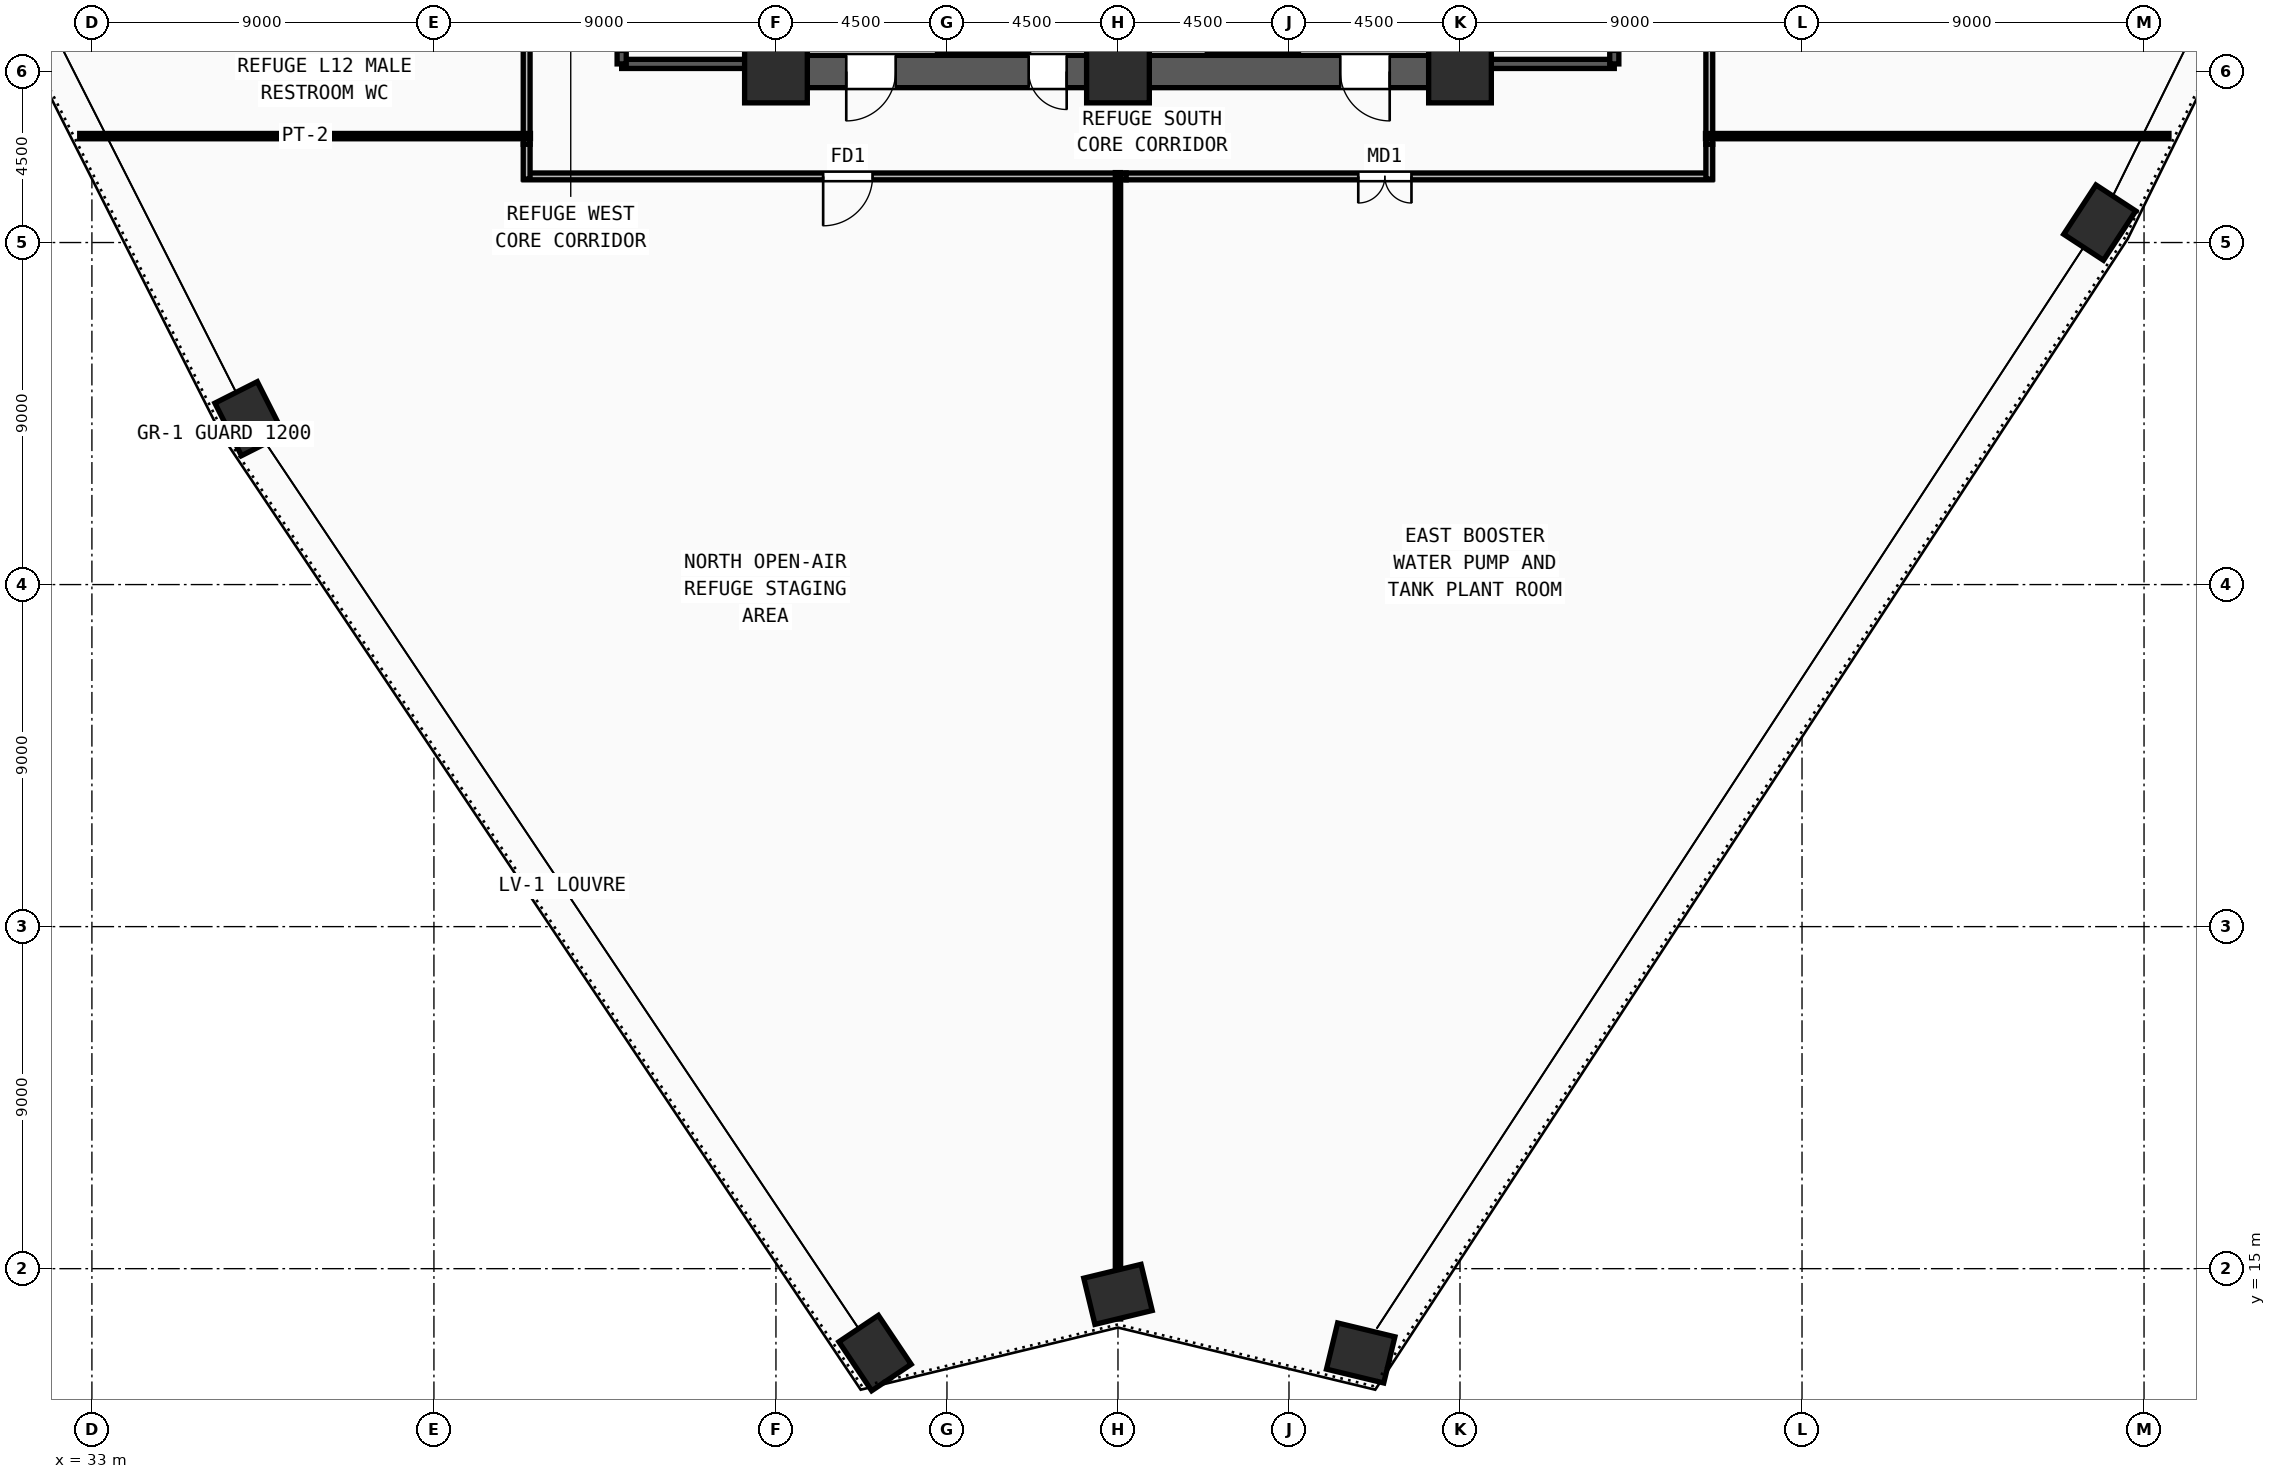
"""IFC4 building model, lengths in metres.
Left out: names, types, materials, properties, quantities, classifications, styles, units other than length and angle.
Written with IfcOpenShell. Run it as: python <this file> out.ifc"""

import sys

from ifc_helpers import new_model, si_unit, direction, frame, frame_2d, origin, origin_2d, place, context, subcontext, project, spatial, rectangle, extrude, source, transform, mapped, element, fill, save


model = new_model("IFC4")
c1 = context("Model", 3, precision=1e-05, world=origin(), true_north=direction((0.0, 1.0)))
c2 = subcontext(c1, "Body", "Model", "MODEL_VIEW")
j1 = project(units=[si_unit("LENGTHUNIT", "METRE"), si_unit("PLANEANGLEUNIT", "RADIAN")], contexts=[c1])
p1 = place(None, origin())
s1 = spatial("IfcSite", under=j1, at=p1, CompositionType="ELEMENT")
p2 = place(p1, origin())
s2 = spatial("IfcBuilding", under=s1, at=p2, CompositionType="ELEMENT")
p3 = place(p2, frame((0.0, 0.0, 47.25)))
s3 = spatial("IfcBuildingStorey", under=s2, at=p3, CompositionType="ELEMENT", Elevation=47.25)
m1 = source(origin(), c2, "Body", "SweptSolid", [
    extrude(rectangle(XDim=1.65, YDim=1.65, at=origin_2d()), origin(), (0.0, 0.0, 1.0), 4.5),
])
for number, where, z_axis, x_axis in (
    (1, (51.0, 46.5, 0.0), (0.0, 0.0, 1.0), (1.0, 0.0, 0.0)),
    (2, (60.0, 46.5, 0.0), (0.0, 0.0, 1.0), (1.0, 0.0, 0.0)),
    (3, (69.0, 46.5, 0.0), (0.0, 0.0, 1.0), (1.0, 0.0, 0.0)),
):
    element("IfcColumn", number, at=place(p3, frame(where, z_axis=z_axis, x_axis=x_axis)), inside=s3, PredefinedType="COLUMN", context=c2, shape_type="MappedRepresentation", body=[
        mapped(m1, transform((0.0, 0.0, 0.0), x_axis=(1.0, 0.0, 0.0), y_axis=(0.0, 1.0, 0.0), z_axis=(0.0, 0.0, 1.0), scale=1.0)),
    ])
m2 = source(origin(), c2, "Body", "SweptSolid", [
    extrude(rectangle(XDim=1.55, YDim=1.25, at=origin_2d()), origin(), (0.0, 0.0, 1.0), 4.5),
])
for number, where, z_axis, x_axis in (
    (4, (53.607, 12.78, 0.0), (0.0, 0.0, 1.0), (-0.556, 0.831, 0.0)),
    (5, (37.144, 37.365, 0.0), (0.0, 0.0, 1.0), (-0.451, 0.892, 0.0)),
    (6, (85.834, 42.524, 0.0), (0.0, 0.0, 1.0), (0.547, 0.837, 0.0)),
    (7, (66.387, 12.782, 0.0), (0.0, 0.0, 1.0), (-0.972, 0.235, 0.0)),
    (8, (60.0, 14.324, 0.0), (0.0, 0.0, 1.0), (0.972, 0.235, 0.0)),
):
    element("IfcColumn", number, at=place(p3, frame(where, z_axis=z_axis, x_axis=x_axis)), inside=s3, PredefinedType="COLUMN", context=c2, shape_type="MappedRepresentation", body=[
        mapped(m2, transform((0.0, 0.0, 0.0), x_axis=(1.0, 0.0, 0.0), y_axis=(0.0, 1.0, 0.0), z_axis=(0.0, 0.0, 1.0), scale=1.0)),
    ])
p4 = place(p3, frame((68.175, 46.5, 0.0), z_axis=(0.0, 0.0, 1.0), x_axis=(-1.0, 0.0, 0.0)))
e9 = element("IfcWall", 9, at=p4, inside=s3, PredefinedType="SHEAR", context=c2, shape_type="SweptSolid", body=[
    extrude(rectangle(XDim=7.35, YDim=0.85, at=frame_2d((3.675, 0.0))), origin(), (0.0, 0.0, 1.0), 4.32),
])
m3 = source(origin(), c2, "Body", "SweptSolid", [
    extrude(rectangle(XDim=1.3, YDim=2.2, at=frame_2d((0.65, 1.1))), frame((0.0, 0.435, 0.0), z_axis=(0.0, -1.0, 0.0), x_axis=(1.0, 0.0, 0.0)), (0.0, 0.0, 1.0), 0.87),
])
p5 = place(p4, frame((1.025, 0.0, 0.0)))
e10 = element("IfcOpeningElement", 10, at=p5, cuts=e9, PredefinedType="OPENING", context=c2, shape_type="MappedRepresentation", body=[
    mapped(m3, transform((0.0, 0.0, 0.0), x_axis=(1.0, 0.0, 0.0), y_axis=(0.0, 1.0, 0.0), z_axis=(0.0, 0.0, 1.0), scale=1.0)),
])
p6 = place(p3, frame((59.175, 46.5, 0.0), z_axis=(0.0, 0.0, 1.0), x_axis=(-1.0, 0.0, 0.0)))
e11 = element("IfcWall", 11, at=p6, inside=s3, PredefinedType="SHEAR", context=c2, shape_type="SweptSolid", body=[
    extrude(rectangle(XDim=7.35, YDim=0.85, at=frame_2d((3.675, 0.0))), origin(), (0.0, 0.0, 1.0), 4.32),
])
p7 = place(p6, frame((5.025, 0.0, 0.0)))
e12 = element("IfcOpeningElement", 12, at=p7, cuts=e11, PredefinedType="OPENING", context=c2, shape_type="MappedRepresentation", body=[
    mapped(m3, transform((0.0, 0.0, 0.0), x_axis=(1.0, 0.0, 0.0), y_axis=(0.0, 1.0, 0.0), z_axis=(0.0, 0.0, 1.0), scale=1.0)),
])
m4 = source(origin(), c2, "Body", "SweptSolid", [
    extrude(rectangle(XDim=1.0, YDim=2.2, at=frame_2d((0.5, 1.1))), frame((0.0, 0.435, 0.0), z_axis=(0.0, -1.0, 0.0), x_axis=(1.0, 0.0, 0.0)), (0.0, 0.0, 1.0), 0.87),
])
p8 = place(p6, frame((0.525, 0.0, 0.0)))
e13 = element("IfcOpeningElement", 13, at=p8, cuts=e11, PredefinedType="OPENING", context=c2, shape_type="MappedRepresentation", body=[
    mapped(m4, transform((0.0, 0.0, 0.0), x_axis=(1.0, 0.0, 0.0), y_axis=(0.0, 1.0, 0.0), z_axis=(0.0, 0.0, 1.0), scale=1.0)),
])
p9 = place(p3, frame((46.94, 46.7, 0.0), z_axis=(0.0, 0.0, 1.0), x_axis=(1.0, 0.0, 0.0)))
e14 = element("IfcWall", 14, at=p9, inside=s3, PredefinedType="SOLIDWALL", context=c2, shape_type="SweptSolid", body=[
    extrude(rectangle(XDim=3.44, YDim=0.24, at=frame_2d((1.72, 0.0))), origin(), (0.0, 0.0, 1.0), 4.32),
])
p10 = place(p3, frame((50.38, 46.7, 0.0), z_axis=(0.0, 0.0, 1.0), x_axis=(0.0, 1.0, 0.0)))
e15 = element("IfcWall", 15, at=p10, inside=s3, PredefinedType="SOLIDWALL", context=c2, shape_type="SweptSolid", body=[
    extrude(rectangle(XDim=7.82, YDim=0.24, at=frame_2d((3.91, 0.0))), origin(), (0.0, 0.0, 1.0), 4.32),
])
p11 = place(p3, frame((46.94, 54.52, 0.0), z_axis=(0.0, 0.0, 1.0), x_axis=(0.0, -1.0, 0.0)))
e16 = element("IfcWall", 16, at=p11, inside=s3, PredefinedType="SOLIDWALL", context=c2, shape_type="SweptSolid", body=[
    extrude(rectangle(XDim=7.82, YDim=0.24, at=frame_2d((3.91, 0.0))), origin(), (0.0, 0.0, 1.0), 4.32),
])
m5 = source(origin(), c2, "Body", "SweptSolid", [
    extrude(rectangle(XDim=1.2, YDim=2.2, at=frame_2d((0.6, 1.1))), frame((0.0, 0.13, 0.0), z_axis=(0.0, -1.0, 0.0), x_axis=(1.0, 0.0, 0.0)), (0.0, 0.0, 1.0), 0.26),
])
p12 = place(p11, frame((6.3, 0.0, 0.0)))
e17 = element("IfcOpeningElement", 17, at=p12, cuts=e16, PredefinedType="OPENING", context=c2, shape_type="MappedRepresentation", body=[
    mapped(m5, transform((0.0, 0.0, 0.0), x_axis=(1.0, 0.0, 0.0), y_axis=(0.0, 1.0, 0.0), z_axis=(0.0, 0.0, 1.0), scale=1.0)),
])
p13 = place(p3, frame((69.62, 46.7, 0.0), z_axis=(0.0, 0.0, 1.0), x_axis=(1.0, 0.0, 0.0)))
e18 = element("IfcWall", 18, at=p13, inside=s3, PredefinedType="SOLIDWALL", context=c2, shape_type="SweptSolid", body=[
    extrude(rectangle(XDim=3.44, YDim=0.24, at=frame_2d((1.72, 0.0))), origin(), (0.0, 0.0, 1.0), 4.32),
])
p14 = place(p3, frame((73.06, 46.7, 0.0), z_axis=(0.0, 0.0, 1.0), x_axis=(0.0, 1.0, 0.0)))
e19 = element("IfcWall", 19, at=p14, inside=s3, PredefinedType="SOLIDWALL", context=c2, shape_type="SweptSolid", body=[
    extrude(rectangle(XDim=7.82, YDim=0.24, at=frame_2d((3.91, 0.0))), origin(), (0.0, 0.0, 1.0), 4.32),
])
p15 = place(p14, frame((0.32, 0.0, 0.0)))
e20 = element("IfcOpeningElement", 20, at=p15, cuts=e19, PredefinedType="OPENING", context=c2, shape_type="MappedRepresentation", body=[
    mapped(m5, transform((0.0, 0.0, 0.0), x_axis=(1.0, 0.0, 0.0), y_axis=(0.0, 1.0, 0.0), z_axis=(0.0, 0.0, 1.0), scale=1.0)),
])
p16 = place(p3, frame((69.62, 54.52, 0.0), z_axis=(0.0, 0.0, 1.0), x_axis=(0.0, -1.0, 0.0)))
e21 = element("IfcWall", 21, at=p16, inside=s3, PredefinedType="SOLIDWALL", context=c2, shape_type="SweptSolid", body=[
    extrude(rectangle(XDim=7.82, YDim=0.24, at=frame_2d((3.91, 0.0))), origin(), (0.0, 0.0, 1.0), 4.32),
])
p17 = place(p3, frame((75.56, 67.015, 0.0), z_axis=(0.0, 0.0, 1.0), x_axis=(0.0, -1.0, 0.0)))
e22 = element("IfcWall", 22, at=p17, inside=s3, PredefinedType="PARTITIONING", context=c2, shape_type="SweptSolid", body=[
    extrude(rectangle(XDim=22.43, YDim=0.18, at=frame_2d((11.215, 0.0))), origin(), (0.0, 0.0, 1.0), 4.32),
])
m6 = source(origin(), c2, "Body", "SweptSolid", [
    extrude(rectangle(XDim=1.3, YDim=2.2, at=frame_2d((0.65, 1.1))), frame((0.0, 0.1, 0.0), z_axis=(0.0, -1.0, 0.0), x_axis=(1.0, 0.0, 0.0)), (0.0, 0.0, 1.0), 0.2),
])
p18 = place(p17, frame((10.565, 0.0, 0.0)))
e23 = element("IfcOpeningElement", 23, at=p18, cuts=e22, PredefinedType="OPENING", context=c2, shape_type="MappedRepresentation", body=[
    mapped(m6, transform((0.0, 0.0, 0.0), x_axis=(1.0, 0.0, 0.0), y_axis=(0.0, 1.0, 0.0), z_axis=(0.0, 0.0, 1.0), scale=1.0)),
])
p19 = place(p3, frame((60.215, 43.74, 0.0), z_axis=(0.0, 0.0, 1.0), x_axis=(-1.0, 0.0, 0.0)))
e24 = element("IfcWall", 24, at=p19, inside=s3, PredefinedType="PARTITIONING", context=c2, shape_type="SweptSolid", body=[
    extrude(rectangle(XDim=15.845, YDim=0.18, at=frame_2d((7.922, 0.0))), origin(), (0.0, 0.0, 1.0), 4.32),
])
p20 = place(p19, frame((6.673, 0.0, 0.0)))
e25 = element("IfcOpeningElement", 25, at=p20, cuts=e24, PredefinedType="OPENING", context=c2, shape_type="MappedRepresentation", body=[
    mapped(m6, transform((0.0, 0.0, 0.0), x_axis=(1.0, 0.0, 0.0), y_axis=(0.0, 1.0, 0.0), z_axis=(0.0, 0.0, 1.0), scale=1.0)),
])
p21 = place(p3, frame((75.63, 43.74, 0.0), z_axis=(0.0, 0.0, 1.0), x_axis=(-1.0, 0.0, 0.0)))
e26 = element("IfcWall", 26, at=p21, inside=s3, PredefinedType="PARTITIONING", context=c2, shape_type="SweptSolid", body=[
    extrude(rectangle(XDim=15.415, YDim=0.18, at=frame_2d((7.708, 0.0))), origin(), (0.0, 0.0, 1.0), 4.32),
])
m7 = source(origin(), c2, "Body", "SweptSolid", [
    extrude(rectangle(XDim=1.4, YDim=2.25, at=frame_2d((0.7, 1.125))), frame((0.0, 0.1, 0.0), z_axis=(0.0, -1.0, 0.0), x_axis=(1.0, 0.0, 0.0)), (0.0, 0.0, 1.0), 0.2),
])
p22 = place(p21, frame((7.907, 0.0, 0.0)))
e27 = element("IfcOpeningElement", 27, at=p22, cuts=e26, PredefinedType="OPENING", context=c2, shape_type="MappedRepresentation", body=[
    mapped(m7, transform((0.0, 0.0, 0.0), x_axis=(1.0, 0.0, 0.0), y_axis=(0.0, 1.0, 0.0), z_axis=(0.0, 0.0, 1.0), scale=1.0)),
])
p23 = place(p3, frame((44.44, 44.585, 0.0), z_axis=(0.0, 0.0, 1.0), x_axis=(0.0, 1.0, 0.0)))
e28 = element("IfcWall", 28, at=p23, inside=s3, PredefinedType="PARTITIONING", context=c2, shape_type="SweptSolid", body=[
    extrude(rectangle(XDim=2.755, YDim=0.18, at=frame_2d((1.377, 0.0))), origin(), (0.0, 0.0, 1.0), 4.32),
])
for number, where, z_axis, x_axis in (
    (29, (44.44, 43.67, 0.0), (0.0, 0.0, 1.0), (0.0, 1.0, 0.0)),
    (30, (75.56, 44.585, 0.0), (0.0, 0.0, 1.0), (0.0, -1.0, 0.0)),
):
    element("IfcWall", number, at=place(p3, frame(where, z_axis=z_axis, x_axis=x_axis)), inside=s3, PredefinedType="PARTITIONING", context=c2, shape_type="SweptSolid", body=[
        extrude(rectangle(XDim=0.915, YDim=0.18, at=frame_2d((0.458, 0.0))), origin(), (0.0, 0.0, 1.0), 4.32),
    ])
p24 = place(p3, frame((44.54, 44.8, 0.0), z_axis=(0.0, 0.0, 1.0), x_axis=(-1.0, 0.0, 0.0)))
e31 = element("IfcWall", 31, at=p24, inside=s3, PredefinedType="PARTITIONING", context=c2, shape_type="SweptSolid", body=[
    extrude(rectangle(XDim=11.861, YDim=0.14, at=frame_2d((5.931, 0.0))), origin(), (0.0, 0.0, 1.0), 4.32),
])
p25 = place(p3, frame((75.46, 44.8, 0.0), z_axis=(0.0, 0.0, 1.0), x_axis=(1.0, 0.0, 0.0)))
e32 = element("IfcWall", 32, at=p25, inside=s3, PredefinedType="PARTITIONING", context=c2, shape_type="SweptSolid", body=[
    extrude(rectangle(XDim=12.196, YDim=0.14, at=frame_2d((6.098, 0.0))), origin(), (0.0, 0.0, 1.0), 3.455),
])
p26 = place(p3, frame((60.0, 43.84, 0.0), z_axis=(0.0, 0.0, 1.0), x_axis=(0.0, -1.0, 0.0)))
e33 = element("IfcWall", 33, at=p26, inside=s3, PredefinedType="PARTITIONING", context=c2, shape_type="SweptSolid", body=[
    extrude(rectangle(XDim=30.164, YDim=0.14, at=frame_2d((15.082, 0.0))), origin(), (0.0, 0.0, 1.0), 4.32),
])
m8 = source(origin(), c2, "Body", "SweptSolid", [
    extrude(rectangle(XDim=1.3, YDim=2.2, at=frame_2d((0.65, 1.1))), frame((0.0, 0.025, 0.0), z_axis=(0.0, -1.0, 0.0), x_axis=(1.0, 0.0, 0.0)), (0.0, 0.0, 1.0), 0.05),
])
p27 = place(p7, origin())
e34 = element("IfcDoor", 34, at=p27, inside=s3, OperationType="SINGLE_SWING_RIGHT", PredefinedType="DOOR", context=c2, shape_type="MappedRepresentation", body=[
    mapped(m8, transform((0.0, 0.0, 0.0), x_axis=(1.0, 0.0, 0.0), y_axis=(0.0, 1.0, 0.0), z_axis=(0.0, 0.0, 1.0), scale=1.0)),
])
fill(e12, e34)
m9 = source(origin(), c2, "Body", "SweptSolid", [
    extrude(rectangle(XDim=1.0, YDim=2.2, at=frame_2d((0.5, 1.1))), frame((0.0, 0.025, 0.0), z_axis=(0.0, -1.0, 0.0), x_axis=(1.0, 0.0, 0.0)), (0.0, 0.0, 1.0), 0.05),
])
p28 = place(p8, origin())
e35 = element("IfcDoor", 35, at=p28, inside=s3, OperationType="SINGLE_SWING_LEFT", PredefinedType="DOOR", context=c2, shape_type="MappedRepresentation", body=[
    mapped(m9, transform((0.0, 0.0, 0.0), x_axis=(1.0, 0.0, 0.0), y_axis=(0.0, 1.0, 0.0), z_axis=(0.0, 0.0, 1.0), scale=1.0)),
])
fill(e13, e35)
p29 = place(p5, origin())
e36 = element("IfcDoor", 36, at=p29, inside=s3, OperationType="SINGLE_SWING_LEFT", PredefinedType="DOOR", context=c2, shape_type="MappedRepresentation", body=[
    mapped(m8, transform((0.0, 0.0, 0.0), x_axis=(1.0, 0.0, 0.0), y_axis=(0.0, 1.0, 0.0), z_axis=(0.0, 0.0, 1.0), scale=1.0)),
])
fill(e10, e36)
p30 = place(p20, origin())
e37 = element("IfcDoor", 37, at=p30, inside=s3, OperationType="SINGLE_SWING_RIGHT", PredefinedType="DOOR", context=c2, shape_type="MappedRepresentation", body=[
    mapped(m8, transform((0.0, 0.0, 0.0), x_axis=(1.0, 0.0, 0.0), y_axis=(0.0, 1.0, 0.0), z_axis=(0.0, 0.0, 1.0), scale=1.0)),
])
fill(e25, e37)
m10 = source(origin(), c2, "Body", "SweptSolid", [
    extrude(rectangle(XDim=1.4, YDim=2.25, at=frame_2d((0.7, 1.125))), frame((0.0, 0.025, 0.0), z_axis=(0.0, -1.0, 0.0), x_axis=(1.0, 0.0, 0.0)), (0.0, 0.0, 1.0), 0.05),
])
p31 = place(p22, origin())
e38 = element("IfcDoor", 38, at=p31, inside=s3, OperationType="DOUBLE_DOOR_SINGLE_SWING", PredefinedType="DOOR", context=c2, shape_type="MappedRepresentation", body=[
    mapped(m10, transform((0.0, 0.0, 0.0), x_axis=(1.0, 0.0, 0.0), y_axis=(0.0, 1.0, 0.0), z_axis=(0.0, 0.0, 1.0), scale=1.0)),
])
fill(e27, e38)
save(model, sys.argv[1])
